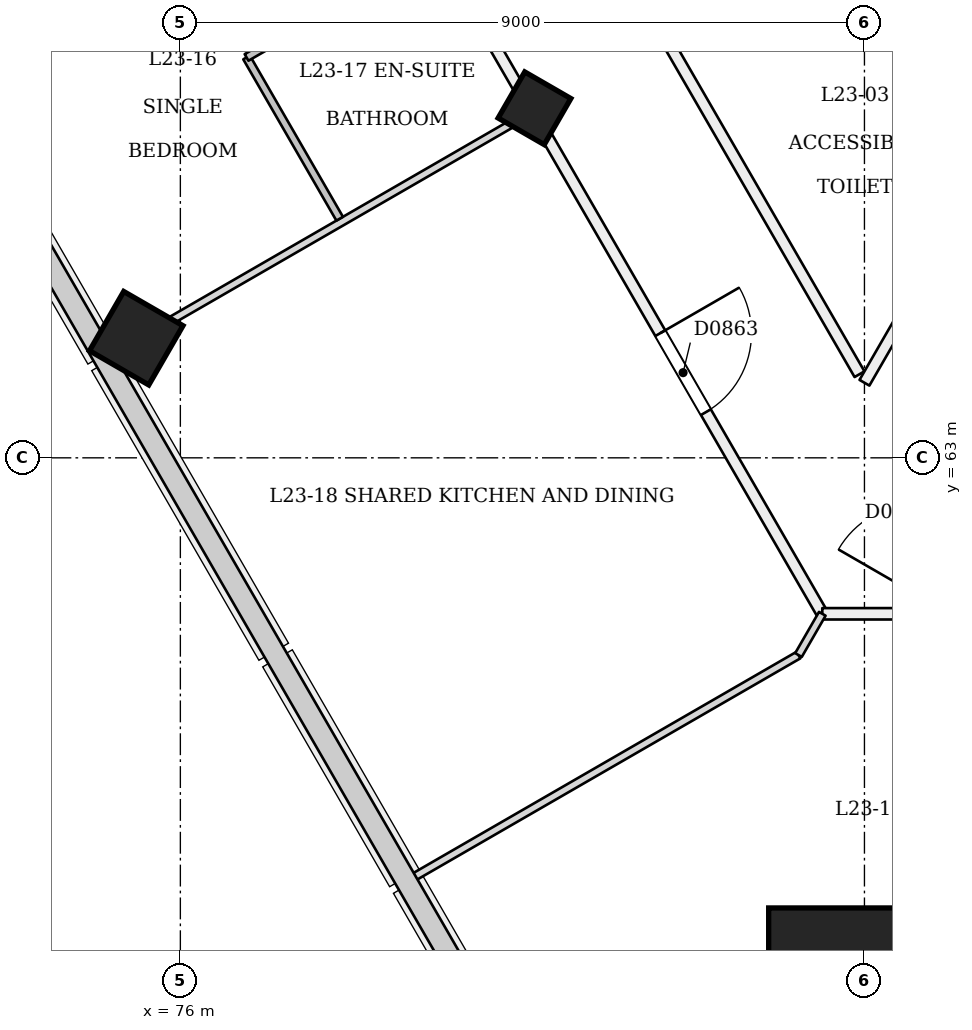
"""IFC4 building model, lengths in metres.
Left out: names, types, materials, properties, quantities, classifications, styles, units other than length and angle.
Written with IfcOpenShell. Run it as: python <this file> out.ifc"""

import sys

from ifc_helpers import new_model, si_unit, direction, frame, frame_2d, origin, origin_2d, place, context, subcontext, project, spatial, rectangle, extrude, element, fill, save


model = new_model("IFC4")
c1 = context("Model", 3, precision=1e-05, world=origin(), true_north=direction((0.0, 1.0)))
c2 = subcontext(c1, "Body", "Model", "MODEL_VIEW")
j1 = project(units=[si_unit("LENGTHUNIT", "METRE"), si_unit("PLANEANGLEUNIT", "RADIAN")], contexts=[c1])
p1 = place(None, origin())
s1 = spatial("IfcSite", under=j1, at=p1, CompositionType="ELEMENT")
p2 = place(p1, origin())
s2 = spatial("IfcBuilding", under=s1, at=p2, CompositionType="ELEMENT")
p3 = place(p2, frame((0.0, 0.0, 91.8)))
s3 = spatial("IfcBuildingStorey", under=s2, at=p3, CompositionType="ELEMENT", Elevation=91.8)
p4 = place(p3, frame((80.632, 67.552, -0.021), z_axis=(0.02215519141, 0.038415882353, 0.999016199807), x_axis=(-0.865361930339, -0.499673644695, 0.03840544644)))
e1 = element("IfcColumn", 1, at=p4, inside=s3, PredefinedType="COLUMN", context=c2, shape_type="SweptSolid", body=[
    extrude(rectangle(XDim=0.7, YDim=0.7, at=origin_2d()), origin(), (0.0, 0.0, 1.0), 3.604),
])
p5 = place(p3, frame((85.0, 55.748, 0.0), z_axis=(0.0, 0.058360852261, 0.998295552892), x_axis=(-1.0, 0.0, 0.0)))
e2 = element("IfcColumn", 2, at=p5, inside=s3, PredefinedType="COLUMN", context=c2, shape_type="SweptSolid", body=[
    extrude(rectangle(XDim=2.52, YDim=2.52, at=origin_2d()), origin(), (0.0, 0.0, 1.0), 3.606),
])
p6 = place(p3, frame((75.392, 64.526, -0.027), z_axis=(0.022189843276, 0.038462395012, 0.999013641061), x_axis=(-0.865437110595, -0.499539582956, 0.038455333375)))
e3 = element("IfcColumn", 3, at=p6, inside=s3, PredefinedType="COLUMN", context=c2, shape_type="SweptSolid", body=[
    extrude(rectangle(XDim=0.9, YDim=0.9, at=origin_2d()), origin(), (0.0, 0.0, 1.0), 3.631),
])
p7 = place(p3, frame((84.935, 64.1, 0.0), z_axis=(0.0, 0.0, 1.0), x_axis=(-0.500003132916, 0.866023594987, 0.0)))
e4 = element("IfcWall", 4, at=p7, inside=s3, PredefinedType="PARTITIONING", context=c2, shape_type="SweptSolid", body=[
    extrude(rectangle(XDim=30.368, YDim=0.15, at=frame_2d((15.184, 0.0))), origin(), (0.0, 0.0, 1.0), 3.3),
])
p8 = place(p7, frame((6.273, 0.0, 0.0)))
e5 = element("IfcOpeningElement", 5, at=p8, cuts=e4, PredefinedType="OPENING", context=c2, shape_type="SweptSolid", body=[
    extrude(rectangle(XDim=0.9, YDim=2.1, at=frame_2d((0.45, 1.05))), frame((0.0, 0.085, 0.0), z_axis=(0.0, -1.0, 0.0), x_axis=(1.0, 0.0, 0.0)), (0.0, 0.0, 1.0), 0.171),
])
p9 = place(p7, frame((21.525, 0.0, 0.0)))
e6 = element("IfcOpeningElement", 6, at=p9, cuts=e4, PredefinedType="OPENING", context=c2, shape_type="SweptSolid", body=[
    extrude(rectangle(XDim=1.0, YDim=2.1, at=frame_2d((0.5, 1.05))), frame((0.0, 0.085, 0.0), z_axis=(0.0, -1.0, 0.0), x_axis=(1.0, 0.0, 0.0)), (0.0, 0.0, 1.0), 0.171),
])
p10 = place(p7, frame((16.921, 0.0, 0.0)))
e7 = element("IfcOpeningElement", 7, at=p10, cuts=e4, PredefinedType="OPENING", context=c2, shape_type="SweptSolid", body=[
    extrude(rectangle(XDim=1.0, YDim=2.1, at=frame_2d((0.5, 1.05))), frame((0.0, 0.085, 0.0), z_axis=(0.0, -1.0, 0.0), x_axis=(1.0, 0.0, 0.0)), (0.0, 0.0, 1.0), 0.171),
])
p11 = place(p7, frame((26.041, 0.0, 0.0)))
e8 = element("IfcOpeningElement", 8, at=p11, cuts=e4, PredefinedType="OPENING", context=c2, shape_type="SweptSolid", body=[
    extrude(rectangle(XDim=1.0, YDim=2.1, at=frame_2d((0.5, 1.05))), frame((0.0, 0.085, 0.0), z_axis=(0.0, -1.0, 0.0), x_axis=(1.0, 0.0, 0.0)), (0.0, 0.0, 1.0), 0.171),
])
p12 = place(p7, frame((12.9, 0.0, 0.0)))
e9 = element("IfcOpeningElement", 9, at=p12, cuts=e4, PredefinedType="OPENING", context=c2, shape_type="SweptSolid", body=[
    extrude(rectangle(XDim=1.0, YDim=2.1, at=frame_2d((0.5, 1.05))), frame((0.0, 0.085, 0.0), z_axis=(0.0, -1.0, 0.0), x_axis=(1.0, 0.0, 0.0)), (0.0, 0.0, 1.0), 0.171),
])
p13 = place(p7, frame((9.569, 0.0, 0.0)))
e10 = element("IfcOpeningElement", 10, at=p13, cuts=e4, PredefinedType="OPENING", context=c2, shape_type="SweptSolid", body=[
    extrude(rectangle(XDim=1.0, YDim=2.1, at=frame_2d((0.5, 1.05))), frame((0.0, 0.085, 0.0), z_axis=(0.0, -1.0, 0.0), x_axis=(1.0, 0.0, 0.0)), (0.0, 0.0, 1.0), 0.171),
])
p14 = place(p3, frame((100.249, 90.4, 0.0), z_axis=(0.0, 0.0, 1.0), x_axis=(-0.500002168127, -0.866024152012, 0.0)))
e11 = element("IfcWall", 11, at=p14, inside=s3, PredefinedType="PARTITIONING", context=c2, shape_type="SweptSolid", body=[
    extrude(rectangle(XDim=30.498, YDim=0.15, at=frame_2d((15.249, 0.0))), origin(), (0.0, 0.0, 1.0), 3.3),
])
p15 = place(p14, frame((27.157, 0.0, 0.0)))
e12 = element("IfcOpeningElement", 12, at=p15, cuts=e11, PredefinedType="OPENING", context=c2, shape_type="SweptSolid", body=[
    extrude(rectangle(XDim=0.9, YDim=2.1, at=frame_2d((0.45, 1.05))), frame((0.0, 0.085, 0.0), z_axis=(0.0, -1.0, 0.0), x_axis=(1.0, 0.0, 0.0)), (0.0, 0.0, 1.0), 0.171),
])
p16 = place(p14, frame((2.412, 0.0, 0.0)))
e13 = element("IfcOpeningElement", 13, at=p16, cuts=e11, PredefinedType="OPENING", context=c2, shape_type="SweptSolid", body=[
    extrude(rectangle(XDim=1.0, YDim=2.1, at=frame_2d((0.5, 1.05))), frame((0.0, 0.085, 0.0), z_axis=(0.0, -1.0, 0.0), x_axis=(1.0, 0.0, 0.0)), (0.0, 0.0, 1.0), 0.171),
])
p17 = place(p14, frame((11.533, 0.0, 0.0)))
e14 = element("IfcOpeningElement", 14, at=p17, cuts=e11, PredefinedType="OPENING", context=c2, shape_type="SweptSolid", body=[
    extrude(rectangle(XDim=1.0, YDim=2.1, at=frame_2d((0.5, 1.05))), frame((0.0, 0.085, 0.0), z_axis=(0.0, -1.0, 0.0), x_axis=(1.0, 0.0, 0.0)), (0.0, 0.0, 1.0), 0.171),
])
p18 = place(p14, frame((18.89, 0.0, 0.0)))
e15 = element("IfcOpeningElement", 15, at=p18, cuts=e11, PredefinedType="OPENING", context=c2, shape_type="SweptSolid", body=[
    extrude(rectangle(XDim=1.2, YDim=2.1, at=frame_2d((0.6, 1.05))), frame((0.0, 0.085, 0.0), z_axis=(0.0, -1.0, 0.0), x_axis=(1.0, 0.0, 0.0)), (0.0, 0.0, 1.0), 0.171),
])
p19 = place(p14, frame((7.003, 0.0, 0.0)))
e16 = element("IfcOpeningElement", 16, at=p19, cuts=e11, PredefinedType="OPENING", context=c2, shape_type="SweptSolid", body=[
    extrude(rectangle(XDim=1.0, YDim=2.1, at=frame_2d((0.5, 1.05))), frame((0.0, 0.085, 0.0), z_axis=(0.0, -1.0, 0.0), x_axis=(1.0, 0.0, 0.0)), (0.0, 0.0, 1.0), 0.171),
])
p20 = place(p14, frame((15.43, 0.0, 0.0)))
e17 = element("IfcOpeningElement", 17, at=p20, cuts=e11, PredefinedType="OPENING", context=c2, shape_type="SweptSolid", body=[
    extrude(rectangle(XDim=1.0, YDim=2.1, at=frame_2d((0.5, 1.05))), frame((0.0, 0.085, 0.0), z_axis=(0.0, -1.0, 0.0), x_axis=(1.0, 0.0, 0.0)), (0.0, 0.0, 1.0), 0.171),
])
p21 = place(p14, frame((22.512, 0.0, 0.0)))
e18 = element("IfcOpeningElement", 18, at=p21, cuts=e11, PredefinedType="OPENING", context=c2, shape_type="SweptSolid", body=[
    extrude(rectangle(XDim=1.2, YDim=2.1, at=frame_2d((0.6, 1.05))), frame((0.0, 0.085, 0.0), z_axis=(0.0, -1.0, 0.0), x_axis=(1.0, 0.0, 0.0)), (0.0, 0.0, 1.0), 0.171),
])
p22 = place(p3, frame((63.319, 97.54, 0.0), z_axis=(0.0, 0.0, 1.0), x_axis=(0.500001382442, -0.86602460563, 0.0)))
e19 = element("IfcWall", 19, at=p22, inside=s3, PredefinedType="PARTITIONING", context=c2, shape_type="SweptSolid", body=[
    extrude(rectangle(XDim=42.252, YDim=0.15, at=frame_2d((21.126, 0.0))), origin(), (0.0, 0.0, 1.0), 2.9),
])
p23 = place(p22, frame((3.076, 0.0, 0.0)))
e20 = element("IfcOpeningElement", 20, at=p23, cuts=e19, PredefinedType="OPENING", context=c2, shape_type="SweptSolid", body=[
    extrude(rectangle(XDim=1.2, YDim=2.1, at=frame_2d((0.6, 1.05))), frame((0.0, 0.085, 0.0), z_axis=(0.0, -1.0, 0.0), x_axis=(1.0, 0.0, 0.0)), (0.0, 0.0, 1.0), 0.171),
])
p24 = place(p22, frame((10.455, 0.0, 0.0)))
e21 = element("IfcOpeningElement", 21, at=p24, cuts=e19, PredefinedType="OPENING", context=c2, shape_type="SweptSolid", body=[
    extrude(rectangle(XDim=1.1, YDim=2.1, at=frame_2d((0.55, 1.05))), frame((0.0, 0.085, 0.0), z_axis=(0.0, -1.0, 0.0), x_axis=(1.0, 0.0, 0.0)), (0.0, 0.0, 1.0), 0.171),
])
p25 = place(p22, frame((13.876, 0.0, 0.0)))
e22 = element("IfcOpeningElement", 22, at=p25, cuts=e19, PredefinedType="OPENING", context=c2, shape_type="SweptSolid", body=[
    extrude(rectangle(XDim=1.0, YDim=2.1, at=frame_2d((0.5, 1.05))), frame((0.0, 0.085, 0.0), z_axis=(0.0, -1.0, 0.0), x_axis=(1.0, 0.0, 0.0)), (0.0, 0.0, 1.0), 0.171),
])
p26 = place(p22, frame((18.376, 0.0, 0.0)))
e23 = element("IfcOpeningElement", 23, at=p26, cuts=e19, PredefinedType="OPENING", context=c2, shape_type="SweptSolid", body=[
    extrude(rectangle(XDim=1.0, YDim=2.1, at=frame_2d((0.5, 1.05))), frame((0.0, 0.085, 0.0), z_axis=(0.0, -1.0, 0.0), x_axis=(1.0, 0.0, 0.0)), (0.0, 0.0, 1.0), 0.171),
])
p27 = place(p22, frame((21.731, 0.0, 0.0)))
e24 = element("IfcOpeningElement", 24, at=p27, cuts=e19, PredefinedType="OPENING", context=c2, shape_type="SweptSolid", body=[
    extrude(rectangle(XDim=1.0, YDim=2.1, at=frame_2d((0.5, 1.05))), frame((0.0, 0.085, 0.0), z_axis=(0.0, -1.0, 0.0), x_axis=(1.0, 0.0, 0.0)), (0.0, 0.0, 1.0), 0.171),
])
p28 = place(p22, frame((28.406, 0.0, 0.0)))
e25 = element("IfcOpeningElement", 25, at=p28, cuts=e19, PredefinedType="OPENING", context=c2, shape_type="SweptSolid", body=[
    extrude(rectangle(XDim=1.0, YDim=2.1, at=frame_2d((0.5, 1.05))), frame((0.0, 0.085, 0.0), z_axis=(0.0, -1.0, 0.0), x_axis=(1.0, 0.0, 0.0)), (0.0, 0.0, 1.0), 0.171),
])
p29 = place(p22, frame((30.847, 0.0, 0.0)))
e26 = element("IfcOpeningElement", 26, at=p29, cuts=e19, PredefinedType="OPENING", context=c2, shape_type="SweptSolid", body=[
    extrude(rectangle(XDim=1.0, YDim=2.1, at=frame_2d((0.5, 1.05))), frame((0.0, 0.085, 0.0), z_axis=(0.0, -1.0, 0.0), x_axis=(1.0, 0.0, 0.0)), (0.0, 0.0, 1.0), 0.171),
])
p30 = place(p22, frame((37.989, 0.0, 0.0)))
e27 = element("IfcOpeningElement", 27, at=p30, cuts=e19, PredefinedType="OPENING", context=c2, shape_type="SweptSolid", body=[
    extrude(rectangle(XDim=1.2, YDim=2.1, at=frame_2d((0.6, 1.05))), frame((0.0, 0.085, 0.0), z_axis=(0.0, -1.0, 0.0), x_axis=(1.0, 0.0, 0.0)), (0.0, 0.0, 1.0), 0.171),
])
p31 = place(p3, frame((84.446, 60.948, 0.0), z_axis=(0.0, 0.0, 1.0), x_axis=(1.0, 0.0, 0.0)))
e28 = element("IfcWall", 28, at=p31, inside=s3, PredefinedType="PARTITIONING", context=c2, shape_type="SweptSolid", body=[
    extrude(rectangle(XDim=1.109, YDim=0.15, at=frame_2d((0.554, 0.0))), origin(), (0.0, 0.0, 1.0), 3.3),
])
p32 = place(p3, frame((86.947, 67.56, 0.0), z_axis=(0.0, 0.0, 1.0), x_axis=(-0.499983865786, 0.866034718677, 0.0)))
e29 = element("IfcWall", 29, at=p32, inside=s3, PredefinedType="PARTITIONING", context=c2, shape_type="SweptSolid", body=[
    extrude(rectangle(XDim=6.468, YDim=0.1, at=frame_2d((3.234, 0.0))), origin(), (0.0, 0.0, 1.0), 3.3),
])
p33 = place(p3, frame((72.822, 68.24, 0.0), z_axis=(0.0, 0.0, 1.0), x_axis=(0.866025401434, 0.500000004071, 0.0)))
e30 = element("IfcWall", 30, at=p33, inside=s3, PredefinedType="PARTITIONING", context=c2, shape_type="SweptSolid", body=[
    extrude(rectangle(XDim=6.345, YDim=0.15, at=frame_2d((3.173, 0.0))), origin(), (0.0, 0.0, 1.0), 3.3),
])
p34 = place(p3, frame((78.096, 66.146, 0.0), z_axis=(0.0, 0.0, 1.0), x_axis=(-0.500018594424, 0.866014668023, 0.0)))
e31 = element("IfcWall", 31, at=p34, inside=s3, PredefinedType="PARTITIONING", context=c2, shape_type="SweptSolid", body=[
    extrude(rectangle(XDim=2.45, YDim=0.1, at=frame_2d((1.225, 0.0))), origin(), (0.0, 0.0, 1.0), 2.9),
])
p35 = place(p3, frame((76.871, 68.268, 0.0), z_axis=(0.0, 0.0, 1.0), x_axis=(0.866011447264, 0.500024172624, 0.0)))
e32 = element("IfcWall", 32, at=p35, inside=s3, PredefinedType="PARTITIONING", context=c2, shape_type="SweptSolid", body=[
    extrude(rectangle(XDim=2.825, YDim=0.1, at=frame_2d((1.413, 0.0))), origin(), (0.0, 0.0, 1.0), 3.3),
])
p36 = place(p35, frame((1.0, 0.0, 0.0)))
e33 = element("IfcOpeningElement", 33, at=p36, cuts=e32, PredefinedType="OPENING", context=c2, shape_type="SweptSolid", body=[
    extrude(rectangle(XDim=0.9, YDim=2.1, at=frame_2d((0.45, 1.05))), frame((0.0, 0.061, 0.0), z_axis=(0.0, -1.0, 0.0), x_axis=(1.0, 0.0, 0.0)), (0.0, 0.0, 1.0), 0.121),
])
p37 = place(p3, frame((75.09, 64.353, 0.0), z_axis=(0.0, 0.0, 1.0), x_axis=(0.866032601554, 0.49998753289, 0.0)))
e34 = element("IfcWall", 34, at=p37, inside=s3, PredefinedType="PARTITIONING", context=c2, shape_type="SweptSolid", body=[
    extrude(rectangle(XDim=6.325, YDim=0.1, at=frame_2d((3.163, 0.0))), origin(), (0.0, 0.0, 1.0), 2.9),
])
p38 = place(p3, frame((79.042, 57.467, 0.0), z_axis=(0.0, 0.0, 1.0), x_axis=(0.866020963352, 0.500007690975, 0.0)))
e35 = element("IfcWall", 35, at=p38, inside=s3, PredefinedType="PARTITIONING", context=c2, shape_type="SweptSolid", body=[
    extrude(rectangle(XDim=5.878, YDim=0.1, at=frame_2d((2.939, 0.0))), origin(), (0.0, 0.0, 1.0), 3.3),
])
p39 = place(p3, frame((84.132, 60.406, 0.0), z_axis=(0.0, 0.0, 1.0), x_axis=(0.500037327496, 0.866003851672, 0.0)))
e36 = element("IfcWall", 36, at=p39, inside=s3, PredefinedType="PARTITIONING", context=c2, shape_type="SweptSolid", body=[
    extrude(rectangle(XDim=0.626, YDim=0.1, at=frame_2d((0.313, 0.0))), origin(), (0.0, 0.0, 1.0), 3.3),
])
p40 = place(p30, origin())
e37 = element("IfcDoor", 37, at=p40, inside=s3, OperationType="SINGLE_SWING_LEFT", PredefinedType="NOTDEFINED", context=c2, shape_type="SweptSolid", body=[
    extrude(rectangle(XDim=1.2, YDim=2.1, at=frame_2d((0.6, 1.05))), frame((0.0, 0.025, 0.0), z_axis=(0.0, -1.0, 0.0), x_axis=(1.0, 0.0, 0.0)), (0.0, 0.0, 1.0), 0.05),
])
fill(e27, e37)
save(model, sys.argv[1])
